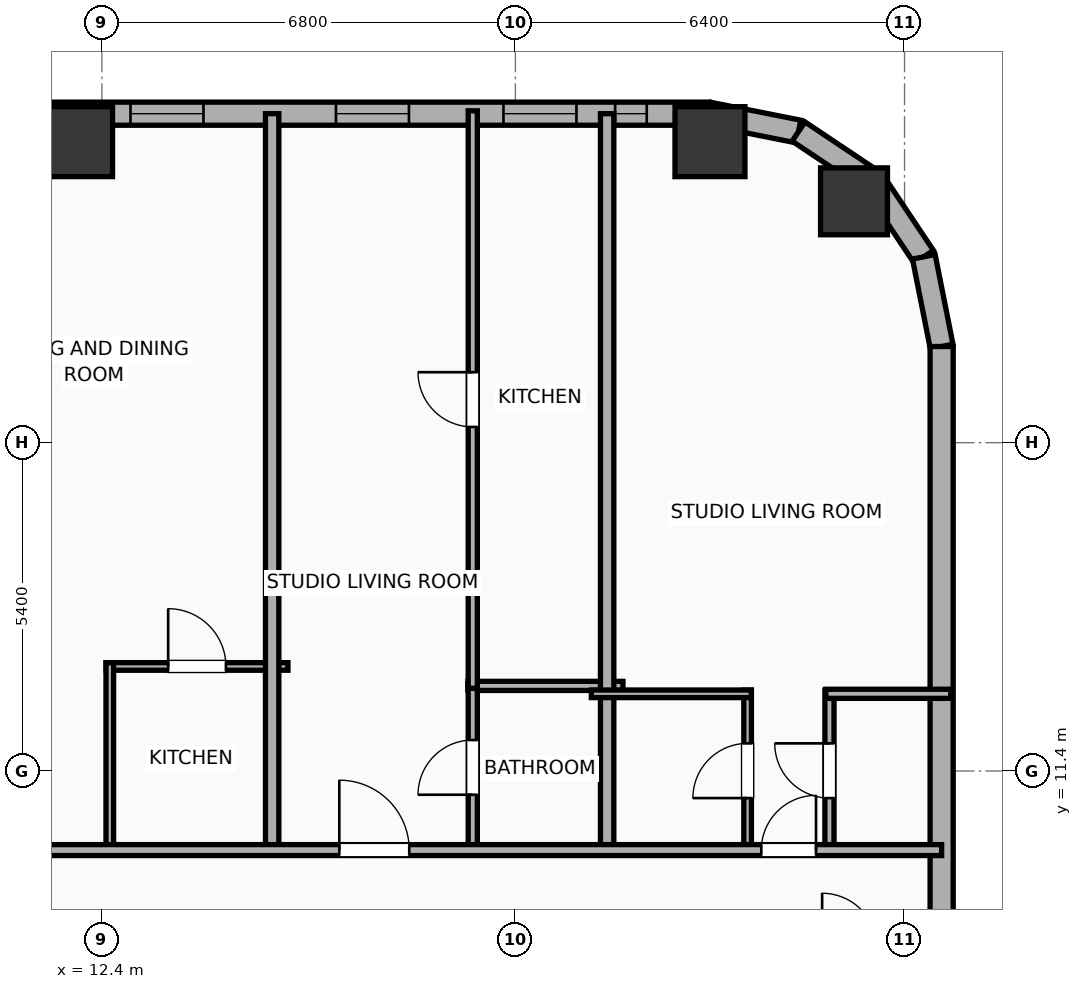
"""IFC4 building model, lengths in metres.
Left out: names, types, materials, properties, quantities, classifications, styles, units other than length and angle.
Written with IfcOpenShell. Run it as: python <this file> out.ifc"""

import sys

from ifc_helpers import new_model, si_unit, direction, frame, frame_2d, origin, origin_2d, place, context, subcontext, project, spatial, rectangle, hollow_rectangle, hollow_circle, extrude, element, fill, save


model = new_model("IFC4")
c1 = context("Model", 3, precision=1e-05, world=origin(), true_north=direction((0.0, 1.0)))
c2 = subcontext(c1, "Body", "Model", "MODEL_VIEW")
j1 = project(units=[si_unit("LENGTHUNIT", "METRE"), si_unit("PLANEANGLEUNIT", "RADIAN")], contexts=[c1])
p1 = place(None, origin())
s1 = spatial("IfcSite", under=j1, at=p1, CompositionType="ELEMENT")
p2 = place(p1, origin())
s2 = spatial("IfcBuilding", under=s1, at=p2, CompositionType="ELEMENT")
p3 = place(p2, frame((0.0, 0.0, 68.9)))
s3 = spatial("IfcBuildingStorey", under=s2, at=p3, CompositionType="ELEMENT", Elevation=68.9)
p4 = place(p3, frame((24.769, 20.769, 0.0), z_axis=(0.0, 0.0, 1.0), x_axis=(1.0, 0.0, 0.0)))
e1 = element("IfcColumn", 1, at=p4, inside=s3, PredefinedType="COLUMN", context=c2, shape_type="SweptSolid", body=[
    extrude(hollow_circle(Radius=0.55, WallThickness=0.036, at=origin_2d()), origin(), (0.0, 0.0, 1.0), 3.9),
])
for number, where, z_axis, x_axis in (
    (2, (22.4, 21.75, 0.0), (0.0, 0.0, 1.0), (1.0, 0.0, 0.0)),
    (3, (12.0, 21.75, 0.0), (0.0, 0.0, 1.0), (1.0, 0.0, 0.0)),
):
    element("IfcColumn", number, at=place(p3, frame(where, z_axis=z_axis, x_axis=x_axis)), inside=s3, PredefinedType="COLUMN", context=c2, shape_type="SweptSolid", body=[
        extrude(hollow_rectangle(XDim=1.15, YDim=1.15, WallThickness=0.04, at=origin_2d()), origin(), (0.0, 0.0, 1.0), 3.9),
    ])
p5 = place(p3, frame((-29.581, 22.21, 0.0), z_axis=(0.0, 0.0, 1.0), x_axis=(1.0, 0.0, 0.0)))
e4 = element("IfcWall", 4, at=p5, inside=s3, PredefinedType="ELEMENTEDWALL", context=c2, shape_type="SweptSolid", body=[
    extrude(rectangle(XDim=51.963, YDim=0.38, at=frame_2d((25.981, 0.0))), origin(), (0.0, 0.0, 1.0), 3.65),
])
p6 = place(p5, frame((5.81, 0.0, 0.75)))
e5 = element("IfcOpeningElement", 5, at=p6, cuts=e4, PredefinedType="OPENING", context=c2, shape_type="SweptSolid", body=[
    extrude(rectangle(XDim=2.4, YDim=2.1, at=frame_2d((1.2, 1.05))), frame((0.0, 0.2, 0.0), z_axis=(0.0, -1.0, 0.0), x_axis=(1.0, 0.0, 0.0)), (0.0, 0.0, 1.0), 0.4),
])
p7 = place(p5, frame((23.931, 0.0, 0.75)))
e6 = element("IfcOpeningElement", 6, at=p7, cuts=e4, PredefinedType="OPENING", context=c2, shape_type="SweptSolid", body=[
    extrude(rectangle(XDim=2.4, YDim=2.1, at=frame_2d((1.2, 1.05))), frame((0.0, 0.2, 0.0), z_axis=(0.0, -1.0, 0.0), x_axis=(1.0, 0.0, 0.0)), (0.0, 0.0, 1.0), 0.4),
])
p8 = place(p5, frame((3.056, 0.0, 0.75)))
e7 = element("IfcOpeningElement", 7, at=p8, cuts=e4, PredefinedType="OPENING", context=c2, shape_type="SweptSolid", body=[
    extrude(rectangle(XDim=1.2, YDim=2.05, at=frame_2d((0.6, 1.025))), frame((0.0, 0.2, 0.0), z_axis=(0.0, -1.0, 0.0), x_axis=(1.0, 0.0, 0.0)), (0.0, 0.0, 1.0), 0.4),
])
p9 = place(p5, frame((11.127, 0.0, 0.75)))
e8 = element("IfcOpeningElement", 8, at=p9, cuts=e4, PredefinedType="OPENING", context=c2, shape_type="SweptSolid", body=[
    extrude(rectangle(XDim=0.52, YDim=2.05, at=frame_2d((0.26, 1.025))), frame((0.0, 0.2, 0.0), z_axis=(0.0, -1.0, 0.0), x_axis=(1.0, 0.0, 0.0)), (0.0, 0.0, 1.0), 0.4),
])
p10 = place(p5, frame((14.327, 0.0, 0.75)))
e9 = element("IfcOpeningElement", 9, at=p10, cuts=e4, PredefinedType="OPENING", context=c2, shape_type="SweptSolid", body=[
    extrude(rectangle(XDim=1.2, YDim=2.05, at=frame_2d((0.6, 1.025))), frame((0.0, 0.2, 0.0), z_axis=(0.0, -1.0, 0.0), x_axis=(1.0, 0.0, 0.0)), (0.0, 0.0, 1.0), 0.4),
])
p11 = place(p5, frame((21.641, 0.0, 0.75)))
e10 = element("IfcOpeningElement", 10, at=p11, cuts=e4, PredefinedType="OPENING", context=c2, shape_type="SweptSolid", body=[
    extrude(rectangle(XDim=1.2, YDim=2.05, at=frame_2d((0.6, 1.025))), frame((0.0, 0.2, 0.0), z_axis=(0.0, -1.0, 0.0), x_axis=(1.0, 0.0, 0.0)), (0.0, 0.0, 1.0), 0.4),
])
p12 = place(p5, frame((18.486, 0.0, 0.75)))
e11 = element("IfcOpeningElement", 11, at=p12, cuts=e4, PredefinedType="OPENING", context=c2, shape_type="SweptSolid", body=[
    extrude(rectangle(XDim=1.2, YDim=2.05, at=frame_2d((0.6, 1.025))), frame((0.0, 0.2, 0.0), z_axis=(0.0, -1.0, 0.0), x_axis=(1.0, 0.0, 0.0)), (0.0, 0.0, 1.0), 0.4),
])
p13 = place(p5, frame((28.976, 0.0, 0.75)))
e12 = element("IfcOpeningElement", 12, at=p13, cuts=e4, PredefinedType="OPENING", context=c2, shape_type="SweptSolid", body=[
    extrude(rectangle(XDim=1.2, YDim=2.05, at=frame_2d((0.6, 1.025))), frame((0.0, 0.2, 0.0), z_axis=(0.0, -1.0, 0.0), x_axis=(1.0, 0.0, 0.0)), (0.0, 0.0, 1.0), 0.4),
])
p14 = place(p5, frame((33.476, 0.0, 0.75)))
e13 = element("IfcOpeningElement", 13, at=p14, cuts=e4, PredefinedType="OPENING", context=c2, shape_type="SweptSolid", body=[
    extrude(rectangle(XDim=1.2, YDim=2.05, at=frame_2d((0.6, 1.025))), frame((0.0, 0.2, 0.0), z_axis=(0.0, -1.0, 0.0), x_axis=(1.0, 0.0, 0.0)), (0.0, 0.0, 1.0), 0.4),
])
p15 = place(p5, frame((36.752, 0.0, 0.75)))
e14 = element("IfcOpeningElement", 14, at=p15, cuts=e4, PredefinedType="OPENING", context=c2, shape_type="SweptSolid", body=[
    extrude(rectangle(XDim=1.2, YDim=2.05, at=frame_2d((0.6, 1.025))), frame((0.0, 0.2, 0.0), z_axis=(0.0, -1.0, 0.0), x_axis=(1.0, 0.0, 0.0)), (0.0, 0.0, 1.0), 0.4),
])
p16 = place(p5, frame((42.452, 0.0, 0.75)))
e15 = element("IfcOpeningElement", 15, at=p16, cuts=e4, PredefinedType="OPENING", context=c2, shape_type="SweptSolid", body=[
    extrude(rectangle(XDim=1.2, YDim=2.05, at=frame_2d((0.6, 1.025))), frame((0.0, 0.2, 0.0), z_axis=(0.0, -1.0, 0.0), x_axis=(1.0, 0.0, 0.0)), (0.0, 0.0, 1.0), 0.4),
])
p17 = place(p5, frame((45.831, 0.0, 0.75)))
e16 = element("IfcOpeningElement", 16, at=p17, cuts=e4, PredefinedType="OPENING", context=c2, shape_type="SweptSolid", body=[
    extrude(rectangle(XDim=1.2, YDim=2.05, at=frame_2d((0.6, 1.025))), frame((0.0, 0.2, 0.0), z_axis=(0.0, -1.0, 0.0), x_axis=(1.0, 0.0, 0.0)), (0.0, 0.0, 1.0), 0.4),
])
p18 = place(p5, frame((48.585, 0.0, 0.75)))
e17 = element("IfcOpeningElement", 17, at=p18, cuts=e4, PredefinedType="OPENING", context=c2, shape_type="SweptSolid", body=[
    extrude(rectangle(XDim=1.2, YDim=2.05, at=frame_2d((0.6, 1.025))), frame((0.0, 0.2, 0.0), z_axis=(0.0, -1.0, 0.0), x_axis=(1.0, 0.0, 0.0)), (0.0, 0.0, 1.0), 0.4),
])
p19 = place(p5, frame((50.421, 0.0, 0.75)))
e18 = element("IfcOpeningElement", 18, at=p19, cuts=e4, PredefinedType="OPENING", context=c2, shape_type="SweptSolid", body=[
    extrude(rectangle(XDim=0.52, YDim=2.05, at=frame_2d((0.26, 1.025))), frame((0.0, 0.2, 0.0), z_axis=(0.0, -1.0, 0.0), x_axis=(1.0, 0.0, 0.0)), (0.0, 0.0, 1.0), 0.4),
])
p20 = place(p3, frame((22.381, 22.21, 0.0), z_axis=(0.0, 0.0, 1.0), x_axis=(0.980786132421, -0.195086038585, 0.0)))
e19 = element("IfcWall", 19, at=p20, inside=s3, PredefinedType="ELEMENTEDWALL", context=c2, shape_type="SweptSolid", body=[
    extrude(rectangle(XDim=1.504, YDim=0.38, at=frame_2d((0.752, 0.0))), origin(), (0.0, 0.0, 1.0), 3.65),
])
for number, where, z_axis, x_axis in (
    (20, (23.857, 21.917, 0.0), (0.0, 0.0, 1.0), (0.831, -0.556, 0.0)),
    (21, (25.091, 21.091, 0.0), (0.0, 0.0, 1.0), (0.556, -0.831, 0.0)),
):
    element("IfcWall", number, at=place(p3, frame(where, z_axis=z_axis, x_axis=x_axis)), inside=s3, PredefinedType="ELEMENTEDWALL", context=c2, shape_type="SweptSolid", body=[
        extrude(rectangle(XDim=1.485, YDim=0.38, at=frame_2d((0.743, 0.0))), origin(), (0.0, 0.0, 1.0), 3.65),
    ])
p21 = place(p3, frame((25.917, 19.857, 0.0), z_axis=(0.0, 0.0, 1.0), x_axis=(0.195086038585, -0.980786132421, 0.0)))
e22 = element("IfcWall", 22, at=p21, inside=s3, PredefinedType="ELEMENTEDWALL", context=c2, shape_type="SweptSolid", body=[
    extrude(rectangle(XDim=1.504, YDim=0.38, at=frame_2d((0.752, 0.0))), origin(), (0.0, 0.0, 1.0), 3.65),
])
p22 = place(p3, frame((26.21, 18.381, 0.0), z_axis=(0.0, 0.0, 1.0), x_axis=(0.0, -1.0, 0.0)))
e23 = element("IfcWall", 23, at=p22, inside=s3, PredefinedType="ELEMENTEDWALL", context=c2, shape_type="SweptSolid", body=[
    extrude(rectangle(XDim=36.763, YDim=0.38, at=frame_2d((18.381, 0.0))), origin(), (0.0, 0.0, 1.0), 3.65),
])
p23 = place(p22, frame((33.187, 0.0, 0.75)))
e24 = element("IfcOpeningElement", 24, at=p23, cuts=e23, PredefinedType="OPENING", context=c2, shape_type="SweptSolid", body=[
    extrude(rectangle(XDim=1.2, YDim=2.05, at=frame_2d((0.6, 1.025))), frame((0.0, 0.2, 0.0), z_axis=(0.0, -1.0, 0.0), x_axis=(1.0, 0.0, 0.0)), (0.0, 0.0, 1.0), 0.4),
])
p24 = place(p3, frame((12.47, 13.12, 0.0), z_axis=(0.0, 0.0, 1.0), x_axis=(1.0, 0.0, 0.0)))
e25 = element("IfcWall", 25, at=p24, inside=s3, PredefinedType="PARTITIONING", context=c2, shape_type="SweptSolid", body=[
    extrude(rectangle(XDim=2.99, YDim=0.125, at=frame_2d((1.495, 0.0))), origin(), (0.0, 0.0, 1.0), 3.65),
])
p25 = place(p24, frame((1.02, 0.0, 0.0)))
e26 = element("IfcOpeningElement", 26, at=p25, cuts=e25, PredefinedType="OPENING", context=c2, shape_type="SweptSolid", body=[
    extrude(rectangle(XDim=0.95, YDim=2.05, at=frame_2d((0.475, 1.025))), frame((0.0, 0.073, 0.0), z_axis=(0.0, -1.0, 0.0), x_axis=(1.0, 0.0, 0.0)), (0.0, 0.0, 1.0), 0.145),
])
p26 = place(p3, frame((12.53, 10.08, 0.0), z_axis=(0.0, 0.0, 1.0), x_axis=(0.0, 1.0, 0.0)))
e27 = element("IfcWall", 27, at=p26, inside=s3, PredefinedType="PARTITIONING", context=c2, shape_type="SweptSolid", body=[
    extrude(rectangle(XDim=3.1, YDim=0.125, at=frame_2d((1.55, 0.0))), origin(), (0.0, 0.0, 1.0), 2.94),
])
p27 = place(p3, frame((15.2, 10.02, 0.0), z_axis=(0.0, 0.0, 1.0), x_axis=(0.0, 1.0, 0.0)))
e28 = element("IfcWall", 28, at=p27, inside=s3, PredefinedType="PARTITIONING", context=c2, shape_type="SweptSolid", body=[
    extrude(rectangle(XDim=12.19, YDim=0.22, at=frame_2d((6.095, 0.0))), origin(), (0.0, 0.0, 1.0), 3.65),
])
p28 = place(p3, frame((18.419, 12.8, 0.0), z_axis=(0.0, 0.0, 1.0), x_axis=(1.0, 0.0, 0.0)))
e29 = element("IfcWall", 29, at=p28, inside=s3, PredefinedType="PLUMBINGWALL", context=c2, shape_type="SweptSolid", body=[
    extrude(rectangle(XDim=2.55, YDim=0.15, at=frame_2d((1.275, 0.0))), origin(), (0.0, 0.0, 1.0), 3.65),
])
p29 = place(p3, frame((18.499, 10.08, 0.0), z_axis=(0.0, 0.0, 1.0), x_axis=(0.0, 1.0, 0.0)))
e30 = element("IfcWall", 30, at=p29, inside=s3, PredefinedType="PLUMBINGWALL", context=c2, shape_type="SweptSolid", body=[
    extrude(rectangle(XDim=2.76, YDim=0.15, at=frame_2d((1.38, 0.0))), origin(), (0.0, 0.0, 1.0), 3.65),
])
p30 = place(p29, frame((0.93, 0.0, 0.0)))
e31 = element("IfcOpeningElement", 31, at=p30, cuts=e30, PredefinedType="OPENING", context=c2, shape_type="SweptSolid", body=[
    extrude(rectangle(XDim=0.9, YDim=2.05, at=frame_2d((0.45, 1.025))), frame((0.0, 0.085, 0.0), z_axis=(0.0, -1.0, 0.0), x_axis=(1.0, 0.0, 0.0)), (0.0, 0.0, 1.0), 0.17),
])
p31 = place(p3, frame((18.499, 12.76, 0.0), z_axis=(0.0, 0.0, 1.0), x_axis=(0.0, 1.0, 0.0)))
e32 = element("IfcWall", 32, at=p31, inside=s3, PredefinedType="PLUMBINGWALL", context=c2, shape_type="SweptSolid", body=[
    extrude(rectangle(XDim=9.498, YDim=0.15, at=frame_2d((4.749, 0.0))), origin(), (0.0, 0.0, 1.0), 3.65),
])
p32 = place(p31, frame((4.299, 0.0, 0.0)))
e33 = element("IfcOpeningElement", 33, at=p32, cuts=e32, PredefinedType="OPENING", context=c2, shape_type="SweptSolid", body=[
    extrude(rectangle(XDim=0.9, YDim=2.05, at=frame_2d((0.45, 1.025))), frame((0.0, 0.085, 0.0), z_axis=(0.0, -1.0, 0.0), x_axis=(1.0, 0.0, 0.0)), (0.0, 0.0, 1.0), 0.17),
])
p33 = place(p3, frame((20.709, 10.02, 0.0), z_axis=(0.0, 0.0, 1.0), x_axis=(0.0, 1.0, 0.0)))
e34 = element("IfcWall", 34, at=p33, inside=s3, PredefinedType="PARTITIONING", context=c2, shape_type="SweptSolid", body=[
    extrude(rectangle(XDim=12.19, YDim=0.22, at=frame_2d((6.095, 0.0))), origin(), (0.0, 0.0, 1.0), 2.94),
])
p34 = place(p3, frame((23.019, 10.08, 0.0), z_axis=(0.0, 0.0, 1.0), x_axis=(0.0, 1.0, 0.0)))
e35 = element("IfcWall", 35, at=p34, inside=s3, PredefinedType="PARTITIONING", context=c2, shape_type="SweptSolid", body=[
    extrude(rectangle(XDim=2.65, YDim=0.125, at=frame_2d((1.325, 0.0))), origin(), (0.0, 0.0, 1.0), 3.65),
])
p35 = place(p34, frame((0.875, 0.0, 0.0)))
e36 = element("IfcOpeningElement", 36, at=p35, cuts=e35, PredefinedType="OPENING", context=c2, shape_type="SweptSolid", body=[
    extrude(rectangle(XDim=0.9, YDim=2.05, at=frame_2d((0.45, 1.025))), frame((0.0, 0.073, 0.0), z_axis=(0.0, -1.0, 0.0), x_axis=(1.0, 0.0, 0.0)), (0.0, 0.0, 1.0), 0.145),
])
p36 = place(p3, frame((24.365, 10.08, 0.0), z_axis=(0.0, 0.0, 1.0), x_axis=(0.0, 1.0, 0.0)))
e37 = element("IfcWall", 37, at=p36, inside=s3, PredefinedType="PLUMBINGWALL", context=c2, shape_type="SweptSolid", body=[
    extrude(rectangle(XDim=2.65, YDim=0.15, at=frame_2d((1.325, 0.0))), origin(), (0.0, 0.0, 1.0), 3.65),
])
p37 = place(p36, frame((0.875, 0.0, 0.0)))
e38 = element("IfcOpeningElement", 38, at=p37, cuts=e37, PredefinedType="OPENING", context=c2, shape_type="SweptSolid", body=[
    extrude(rectangle(XDim=0.9, YDim=2.05, at=frame_2d((0.45, 1.025))), frame((0.0, 0.085, 0.0), z_axis=(0.0, -1.0, 0.0), x_axis=(1.0, 0.0, 0.0)), (0.0, 0.0, 1.0), 0.17),
])
p38 = place(p3, frame((20.449, 12.67, 0.0), z_axis=(0.0, 0.0, 1.0), x_axis=(1.0, 0.0, 0.0)))
e39 = element("IfcWall", 39, at=p38, inside=s3, PredefinedType="PARTITIONING", context=c2, shape_type="SweptSolid", body=[
    extrude(rectangle(XDim=2.63, YDim=0.125, at=frame_2d((1.315, 0.0))), origin(), (0.0, 0.0, 1.0), 3.65),
])
p39 = place(p3, frame((24.305, 12.67, 0.0), z_axis=(0.0, 0.0, 1.0), x_axis=(1.0, 0.0, 0.0)))
e40 = element("IfcWall", 40, at=p39, inside=s3, PredefinedType="PLUMBINGWALL", context=c2, shape_type="SweptSolid", body=[
    extrude(rectangle(XDim=2.055, YDim=0.15, at=frame_2d((1.028, 0.0))), origin(), (0.0, 0.0, 1.0), 3.65),
])
p40 = place(p3, frame((-33.41, 10.1, 0.0), z_axis=(0.0, 0.0, 1.0), x_axis=(1.0, 0.0, 0.0)))
e41 = element("IfcWall", 41, at=p40, inside=s3, PredefinedType="PARTITIONING", context=c2, shape_type="SweptSolid", body=[
    extrude(rectangle(XDim=59.62, YDim=0.18, at=frame_2d((29.81, 0.0))), origin(), (0.0, 0.0, 1.0), 3.65),
])
p41 = place(p40, frame((2.793, 0.0, 0.0)))
e42 = element("IfcOpeningElement", 42, at=p41, cuts=e41, PredefinedType="OPENING", context=c2, shape_type="SweptSolid", body=[
    extrude(rectangle(XDim=0.9, YDim=2.05, at=frame_2d((0.45, 1.025))), frame((0.0, 0.1, 0.0), z_axis=(0.0, -1.0, 0.0), x_axis=(1.0, 0.0, 0.0)), (0.0, 0.0, 1.0), 0.2),
])
p42 = place(p40, frame((10.037, 0.0, 0.0)))
e43 = element("IfcOpeningElement", 43, at=p42, cuts=e41, PredefinedType="OPENING", context=c2, shape_type="SweptSolid", body=[
    extrude(rectangle(XDim=1.15, YDim=2.05, at=frame_2d((0.575, 1.025))), frame((0.0, 0.1, 0.0), z_axis=(0.0, -1.0, 0.0), x_axis=(1.0, 0.0, 0.0)), (0.0, 0.0, 1.0), 0.2),
])
p43 = place(p40, frame((16.882, 0.0, 0.0)))
e44 = element("IfcOpeningElement", 44, at=p43, cuts=e41, PredefinedType="OPENING", context=c2, shape_type="SweptSolid", body=[
    extrude(rectangle(XDim=1.15, YDim=2.05, at=frame_2d((0.575, 1.025))), frame((0.0, 0.1, 0.0), z_axis=(0.0, -1.0, 0.0), x_axis=(1.0, 0.0, 0.0)), (0.0, 0.0, 1.0), 0.2),
])
p44 = place(p40, frame((25.801, 0.0, 0.0)))
e45 = element("IfcOpeningElement", 45, at=p44, cuts=e41, PredefinedType="OPENING", context=c2, shape_type="SweptSolid", body=[
    extrude(rectangle(XDim=1.15, YDim=2.05, at=frame_2d((0.575, 1.025))), frame((0.0, 0.1, 0.0), z_axis=(0.0, -1.0, 0.0), x_axis=(1.0, 0.0, 0.0)), (0.0, 0.0, 1.0), 0.2),
])
p45 = place(p40, frame((34.72, 0.0, 0.0)))
e46 = element("IfcOpeningElement", 46, at=p45, cuts=e41, PredefinedType="OPENING", context=c2, shape_type="SweptSolid", body=[
    extrude(rectangle(XDim=1.15, YDim=2.05, at=frame_2d((0.575, 1.025))), frame((0.0, 0.1, 0.0), z_axis=(0.0, -1.0, 0.0), x_axis=(1.0, 0.0, 0.0)), (0.0, 0.0, 1.0), 0.2),
])
p46 = place(p40, frame((43.771, 0.0, 0.0)))
e47 = element("IfcOpeningElement", 47, at=p46, cuts=e41, PredefinedType="OPENING", context=c2, shape_type="SweptSolid", body=[
    extrude(rectangle(XDim=1.15, YDim=2.05, at=frame_2d((0.575, 1.025))), frame((0.0, 0.1, 0.0), z_axis=(0.0, -1.0, 0.0), x_axis=(1.0, 0.0, 0.0)), (0.0, 0.0, 1.0), 0.2),
])
p47 = place(p40, frame((49.715, 0.0, 0.0)))
e48 = element("IfcOpeningElement", 48, at=p47, cuts=e41, PredefinedType="OPENING", context=c2, shape_type="SweptSolid", body=[
    extrude(rectangle(XDim=1.15, YDim=2.05, at=frame_2d((0.575, 1.025))), frame((0.0, 0.1, 0.0), z_axis=(0.0, -1.0, 0.0), x_axis=(1.0, 0.0, 0.0)), (0.0, 0.0, 1.0), 0.2),
])
p48 = place(p40, frame((56.654, 0.0, 0.0)))
e49 = element("IfcOpeningElement", 49, at=p48, cuts=e41, PredefinedType="OPENING", context=c2, shape_type="SweptSolid", body=[
    extrude(rectangle(XDim=0.9, YDim=2.05, at=frame_2d((0.45, 1.025))), frame((0.0, 0.1, 0.0), z_axis=(0.0, -1.0, 0.0), x_axis=(1.0, 0.0, 0.0)), (0.0, 0.0, 1.0), 0.2),
])
p49 = place(p16, origin())
e50 = element("IfcWindow", 50, at=p49, inside=s3, PartitioningType="SINGLE_PANEL", PredefinedType="WINDOW", context=c2, shape_type="SweptSolid", body=[
    extrude(rectangle(XDim=1.2, YDim=2.05, at=frame_2d((0.6, 1.025))), frame((0.0, 0.03, 0.0), z_axis=(0.0, -1.0, 0.0), x_axis=(1.0, 0.0, 0.0)), (0.0, 0.0, 1.0), 0.06),
])
fill(e15, e50)
p50 = place(p17, origin())
e51 = element("IfcWindow", 51, at=p50, inside=s3, PartitioningType="SINGLE_PANEL", PredefinedType="WINDOW", context=c2, shape_type="SweptSolid", body=[
    extrude(rectangle(XDim=1.2, YDim=2.05, at=frame_2d((0.6, 1.025))), frame((0.0, 0.03, 0.0), z_axis=(0.0, -1.0, 0.0), x_axis=(1.0, 0.0, 0.0)), (0.0, 0.0, 1.0), 0.06),
])
fill(e16, e51)
p51 = place(p18, origin())
e52 = element("IfcWindow", 52, at=p51, inside=s3, PartitioningType="SINGLE_PANEL", PredefinedType="WINDOW", context=c2, shape_type="SweptSolid", body=[
    extrude(rectangle(XDim=1.2, YDim=2.05, at=frame_2d((0.6, 1.025))), frame((0.0, 0.03, 0.0), z_axis=(0.0, -1.0, 0.0), x_axis=(1.0, 0.0, 0.0)), (0.0, 0.0, 1.0), 0.06),
])
fill(e17, e52)
p52 = place(p19, origin())
e53 = element("IfcWindow", 53, at=p52, inside=s3, PartitioningType="SINGLE_PANEL", PredefinedType="WINDOW", context=c2, shape_type="SweptSolid", body=[
    extrude(rectangle(XDim=0.52, YDim=2.05, at=frame_2d((0.26, 1.025))), frame((0.0, 0.03, 0.0), z_axis=(0.0, -1.0, 0.0), x_axis=(1.0, 0.0, 0.0)), (0.0, 0.0, 1.0), 0.06),
])
fill(e18, e53)
p53 = place(p25, origin())
e54 = element("IfcDoor", 54, at=p53, inside=s3, OperationType="SINGLE_SWING_LEFT", PredefinedType="DOOR", context=c2, shape_type="SweptSolid", body=[
    extrude(rectangle(XDim=0.95, YDim=2.05, at=frame_2d((0.475, 1.025))), frame((0.0, 0.025, 0.0), z_axis=(0.0, -1.0, 0.0), x_axis=(1.0, 0.0, 0.0)), (0.0, 0.0, 1.0), 0.05),
])
fill(e26, e54)
p54 = place(p30, origin())
e55 = element("IfcDoor", 55, at=p54, inside=s3, OperationType="SINGLE_SWING_LEFT", PredefinedType="DOOR", context=c2, shape_type="SweptSolid", body=[
    extrude(rectangle(XDim=0.9, YDim=2.05, at=frame_2d((0.45, 1.025))), frame((0.0, 0.025, 0.0), z_axis=(0.0, -1.0, 0.0), x_axis=(1.0, 0.0, 0.0)), (0.0, 0.0, 1.0), 0.05),
])
fill(e31, e55)
p55 = place(p32, origin())
e56 = element("IfcDoor", 56, at=p55, inside=s3, OperationType="SINGLE_SWING_RIGHT", PredefinedType="DOOR", context=c2, shape_type="SweptSolid", body=[
    extrude(rectangle(XDim=0.9, YDim=2.05, at=frame_2d((0.45, 1.025))), frame((0.0, 0.025, 0.0), z_axis=(0.0, -1.0, 0.0), x_axis=(1.0, 0.0, 0.0)), (0.0, 0.0, 1.0), 0.05),
])
fill(e33, e56)
p56 = place(p35, origin())
e57 = element("IfcDoor", 57, at=p56, inside=s3, OperationType="SINGLE_SWING_LEFT", PredefinedType="DOOR", context=c2, shape_type="SweptSolid", body=[
    extrude(rectangle(XDim=0.9, YDim=2.05, at=frame_2d((0.45, 1.025))), frame((0.0, 0.025, 0.0), z_axis=(0.0, -1.0, 0.0), x_axis=(1.0, 0.0, 0.0)), (0.0, 0.0, 1.0), 0.05),
])
fill(e36, e57)
p57 = place(p37, origin())
e58 = element("IfcDoor", 58, at=p57, inside=s3, OperationType="SINGLE_SWING_RIGHT", PredefinedType="DOOR", context=c2, shape_type="SweptSolid", body=[
    extrude(rectangle(XDim=0.9, YDim=2.05, at=frame_2d((0.45, 1.025))), frame((0.0, 0.025, 0.0), z_axis=(0.0, -1.0, 0.0), x_axis=(1.0, 0.0, 0.0)), (0.0, 0.0, 1.0), 0.05),
])
fill(e38, e58)
p58 = place(p47, origin())
e59 = element("IfcDoor", 59, at=p58, inside=s3, OperationType="SINGLE_SWING_LEFT", PredefinedType="DOOR", context=c2, shape_type="SweptSolid", body=[
    extrude(rectangle(XDim=1.15, YDim=2.05, at=frame_2d((0.575, 1.025))), frame((0.0, 0.025, 0.0), z_axis=(0.0, -1.0, 0.0), x_axis=(1.0, 0.0, 0.0)), (0.0, 0.0, 1.0), 0.05),
])
fill(e48, e59)
p59 = place(p48, origin())
e60 = element("IfcDoor", 60, at=p59, inside=s3, OperationType="SINGLE_SWING_RIGHT", PredefinedType="DOOR", context=c2, shape_type="SweptSolid", body=[
    extrude(rectangle(XDim=0.9, YDim=2.05, at=frame_2d((0.45, 1.025))), frame((0.0, 0.025, 0.0), z_axis=(0.0, -1.0, 0.0), x_axis=(1.0, 0.0, 0.0)), (0.0, 0.0, 1.0), 0.05),
])
fill(e49, e60)
save(model, sys.argv[1])
